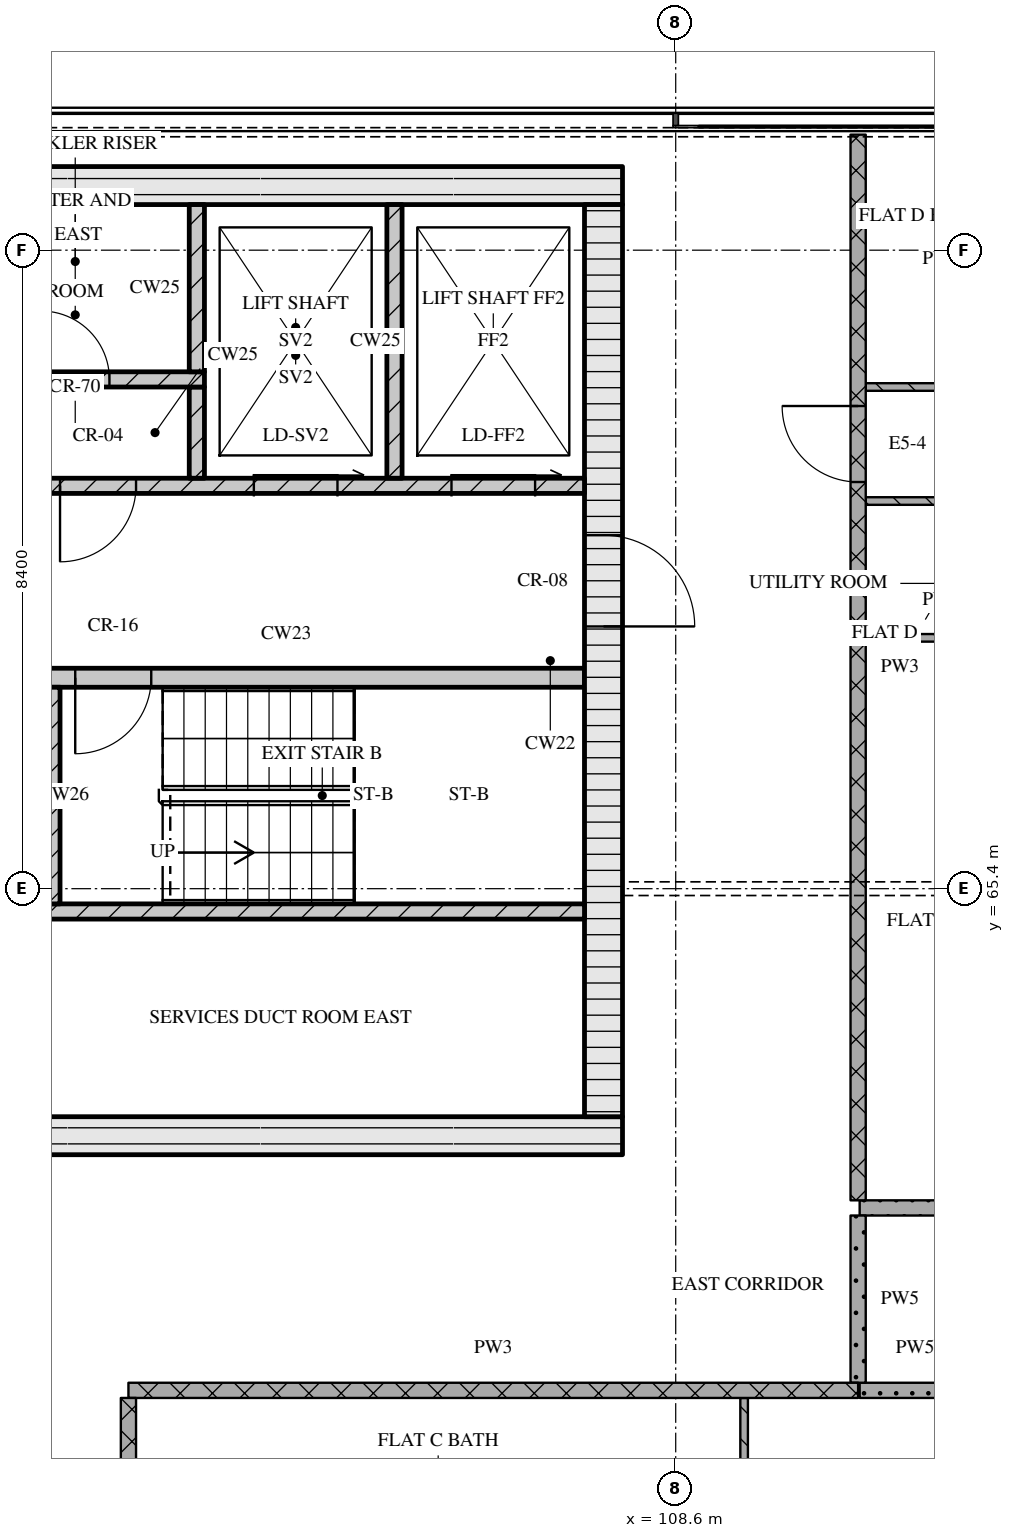
"""IFC4 building model, lengths in metres.
Left out: names, types, materials, properties, quantities, classifications, styles, units other than length and angle.
Written with IfcOpenShell. Run it as: python <this file> out.ifc"""

import sys

from ifc_helpers import new_model, si_unit, direction, frame, frame_2d, origin, place, context, subcontext, project, spatial, rectangle, extrude, element, fill, save


model = new_model("IFC4")
c1 = context("Model", 3, precision=1e-05, world=origin(), true_north=direction((0.0, 1.0)))
c2 = subcontext(c1, "Body", "Model", "MODEL_VIEW")
j1 = project(units=[si_unit("LENGTHUNIT", "METRE"), si_unit("PLANEANGLEUNIT", "RADIAN")], contexts=[c1])
p1 = place(None, origin())
s1 = spatial("IfcSite", under=j1, at=p1, CompositionType="ELEMENT")
p2 = place(p1, origin())
s2 = spatial("IfcBuilding", under=s1, at=p2, CompositionType="ELEMENT")
p3 = place(p2, frame((0.0, 0.0, 295.95)))
s3 = spatial("IfcBuildingStorey", under=s2, at=p3, CompositionType="ELEMENT", Elevation=295.95)
p4 = place(p3, frame((67.3, 62.15, 0.0), z_axis=(0.0, 0.0, 1.0), x_axis=(1.0, 0.0, 0.0)))
e1 = element("IfcWall", 1, at=p4, inside=s3, PredefinedType="SOLIDWALL", context=c2, shape_type="SweptSolid", body=[
    extrude(rectangle(XDim=40.6, YDim=0.5, at=frame_2d((20.3, 0.0))), origin(), (0.0, 0.0, 1.0), 3.32),
])
p5 = place(p4, frame((20.65, 0.0, 0.0)))
e2 = element("IfcOpeningElement", 2, at=p5, cuts=e1, PredefinedType="OPENING", context=c2, shape_type="SweptSolid", body=[
    extrude(rectangle(XDim=1.8, YDim=2.1, at=frame_2d((0.9, 1.05))), frame((0.0, 0.26, 0.0), z_axis=(0.0, -1.0, 0.0), x_axis=(1.0, 0.0, 0.0)), (0.0, 0.0, 1.0), 0.52),
])
p6 = place(p3, frame((67.3, 74.65, 0.0), z_axis=(0.0, 0.0, 1.0), x_axis=(1.0, 0.0, 0.0)))
e3 = element("IfcWall", 3, at=p6, inside=s3, PredefinedType="SOLIDWALL", context=c2, shape_type="SweptSolid", body=[
    extrude(rectangle(XDim=40.6, YDim=0.5, at=frame_2d((20.3, 0.0))), origin(), (0.0, 0.0, 1.0), 3.32),
])
p7 = place(p3, frame((107.65, 62.4, 0.0), z_axis=(0.0, 0.0, 1.0), x_axis=(0.0, 1.0, 0.0)))
e4 = element("IfcWall", 4, at=p7, inside=s3, PredefinedType="SOLIDWALL", context=c2, shape_type="SweptSolid", body=[
    extrude(rectangle(XDim=12.0, YDim=0.5, at=frame_2d((6.0, 0.0))), origin(), (0.0, 0.0, 1.0), 3.32),
])
p8 = place(p7, frame((6.45, 0.0, 0.0)))
e5 = element("IfcOpeningElement", 5, at=p8, cuts=e4, PredefinedType="OPENING", context=c2, shape_type="SweptSolid", body=[
    extrude(rectangle(XDim=1.2, YDim=2.1, at=frame_2d((0.6, 1.05))), frame((0.0, 0.26, 0.0), z_axis=(0.0, -1.0, 0.0), x_axis=(1.0, 0.0, 0.0)), (0.0, 0.0, 1.0), 0.52),
])
p9 = place(p3, frame((91.4, 65.1, 0.0), z_axis=(0.0, 0.0, 1.0), x_axis=(1.0, 0.0, 0.0)))
e6 = element("IfcWall", 6, at=p9, inside=s3, PredefinedType="SOLIDWALL", context=c2, shape_type="SweptSolid", body=[
    extrude(rectangle(XDim=16.0, YDim=0.2, at=frame_2d((8.0, 0.0))), origin(), (0.0, 0.0, 1.0), 3.32),
])
p10 = place(p9, frame((0.85, 0.0, 0.0)))
e7 = element("IfcOpeningElement", 7, at=p10, cuts=e6, PredefinedType="OPENING", context=c2, shape_type="SweptSolid", body=[
    extrude(rectangle(XDim=1.1, YDim=2.1, at=frame_2d((0.55, 1.05))), frame((0.0, 0.11, 0.0), z_axis=(0.0, -1.0, 0.0), x_axis=(1.0, 0.0, 0.0)), (0.0, 0.0, 1.0), 0.22),
])
p11 = place(p9, frame((3.35, 0.0, 0.0)))
e8 = element("IfcOpeningElement", 8, at=p11, cuts=e6, PredefinedType="OPENING", context=c2, shape_type="SweptSolid", body=[
    extrude(rectangle(XDim=1.1, YDim=2.1, at=frame_2d((0.55, 1.05))), frame((0.0, 0.11, 0.0), z_axis=(0.0, -1.0, 0.0), x_axis=(1.0, 0.0, 0.0)), (0.0, 0.0, 1.0), 0.22),
])
p12 = place(p9, frame((5.85, 0.0, 0.0)))
e9 = element("IfcOpeningElement", 9, at=p12, cuts=e6, PredefinedType="OPENING", context=c2, shape_type="SweptSolid", body=[
    extrude(rectangle(XDim=1.1, YDim=2.1, at=frame_2d((0.55, 1.05))), frame((0.0, 0.11, 0.0), z_axis=(0.0, -1.0, 0.0), x_axis=(1.0, 0.0, 0.0)), (0.0, 0.0, 1.0), 0.22),
])
p13 = place(p9, frame((7.83, 0.0, 0.0)))
e10 = element("IfcOpeningElement", 10, at=p13, cuts=e6, PredefinedType="OPENING", context=c2, shape_type="SweptSolid", body=[
    extrude(rectangle(XDim=0.9, YDim=2.1, at=frame_2d((0.45, 1.05))), frame((0.0, 0.11, 0.0), z_axis=(0.0, -1.0, 0.0), x_axis=(1.0, 0.0, 0.0)), (0.0, 0.0, 1.0), 0.22),
])
p14 = place(p3, frame((100.35, 65.2, 0.0), z_axis=(0.0, 0.0, 1.0), x_axis=(0.0, 1.0, 0.0)))
e11 = element("IfcWall", 11, at=p14, inside=s3, PredefinedType="SOLIDWALL", context=c2, shape_type="SweptSolid", body=[
    extrude(rectangle(XDim=2.85, YDim=0.3, at=frame_2d((1.425, 0.0))), origin(), (0.0, 0.0, 1.0), 3.32),
])
p15 = place(p3, frame((98.95, 68.175, 0.0), z_axis=(0.0, 0.0, 1.0), x_axis=(1.0, 0.0, 0.0)))
e12 = element("IfcWall", 12, at=p15, inside=s3, PredefinedType="SOLIDWALL", context=c2, shape_type="SweptSolid", body=[
    extrude(rectangle(XDim=8.45, YDim=0.25, at=frame_2d((4.225, 0.0))), origin(), (0.0, 0.0, 1.0), 3.32),
])
p16 = place(p15, frame((0.45, 0.0, 0.0)))
e13 = element("IfcOpeningElement", 13, at=p16, cuts=e12, PredefinedType="OPENING", context=c2, shape_type="SweptSolid", body=[
    extrude(rectangle(XDim=0.8, YDim=2.1, at=frame_2d((0.4, 1.05))), frame((0.0, 0.135, 0.0), z_axis=(0.0, -1.0, 0.0), x_axis=(1.0, 0.0, 0.0)), (0.0, 0.0, 1.0), 0.27),
])
p17 = place(p15, frame((1.75, 0.0, 0.0)))
e14 = element("IfcOpeningElement", 14, at=p17, cuts=e12, PredefinedType="OPENING", context=c2, shape_type="SweptSolid", body=[
    extrude(rectangle(XDim=1.0, YDim=2.1, at=frame_2d((0.5, 1.05))), frame((0.0, 0.135, 0.0), z_axis=(0.0, -1.0, 0.0), x_axis=(1.0, 0.0, 0.0)), (0.0, 0.0, 1.0), 0.27),
])
p18 = place(p3, frame((67.8, 70.7, 0.0), z_axis=(0.0, 0.0, 1.0), x_axis=(1.0, 0.0, 0.0)))
e15 = element("IfcWall", 15, at=p18, inside=s3, PredefinedType="SOLIDWALL", context=c2, shape_type="SweptSolid", body=[
    extrude(rectangle(XDim=39.6, YDim=0.2, at=frame_2d((19.8, 0.0))), origin(), (0.0, 0.0, 1.0), 3.32),
])
p19 = place(p18, frame((0.65, 0.0, 0.0)))
e16 = element("IfcOpeningElement", 16, at=p19, cuts=e15, PredefinedType="OPENING", context=c2, shape_type="SweptSolid", body=[
    extrude(rectangle(XDim=1.1, YDim=2.1, at=frame_2d((0.55, 1.05))), frame((0.0, 0.11, 0.0), z_axis=(0.0, -1.0, 0.0), x_axis=(1.0, 0.0, 0.0)), (0.0, 0.0, 1.0), 0.22),
])
p20 = place(p18, frame((3.25, 0.0, 0.0)))
e17 = element("IfcOpeningElement", 17, at=p20, cuts=e15, PredefinedType="OPENING", context=c2, shape_type="SweptSolid", body=[
    extrude(rectangle(XDim=1.1, YDim=2.1, at=frame_2d((0.55, 1.05))), frame((0.0, 0.11, 0.0), z_axis=(0.0, -1.0, 0.0), x_axis=(1.0, 0.0, 0.0)), (0.0, 0.0, 1.0), 0.22),
])
p21 = place(p18, frame((5.9, 0.0, 0.0)))
e18 = element("IfcOpeningElement", 18, at=p21, cuts=e15, PredefinedType="OPENING", context=c2, shape_type="SweptSolid", body=[
    extrude(rectangle(XDim=1.0, YDim=2.1, at=frame_2d((0.5, 1.05))), frame((0.0, 0.11, 0.0), z_axis=(0.0, -1.0, 0.0), x_axis=(1.0, 0.0, 0.0)), (0.0, 0.0, 1.0), 0.22),
])
p22 = place(p18, frame((21.7, 0.0, 0.0)))
e19 = element("IfcOpeningElement", 19, at=p22, cuts=e15, PredefinedType="OPENING", context=c2, shape_type="SweptSolid", body=[
    extrude(rectangle(XDim=1.0, YDim=2.1, at=frame_2d((0.5, 1.05))), frame((0.0, 0.11, 0.0), z_axis=(0.0, -1.0, 0.0), x_axis=(1.0, 0.0, 0.0)), (0.0, 0.0, 1.0), 0.22),
])
p23 = place(p18, frame((32.7, 0.0, 0.0)))
e20 = element("IfcOpeningElement", 20, at=p23, cuts=e15, PredefinedType="OPENING", context=c2, shape_type="SweptSolid", body=[
    extrude(rectangle(XDim=1.0, YDim=2.1, at=frame_2d((0.5, 1.05))), frame((0.0, 0.11, 0.0), z_axis=(0.0, -1.0, 0.0), x_axis=(1.0, 0.0, 0.0)), (0.0, 0.0, 1.0), 0.22),
])
p24 = place(p18, frame((35.25, 0.0, 0.0)))
e21 = element("IfcOpeningElement", 21, at=p24, cuts=e15, PredefinedType="OPENING", context=c2, shape_type="SweptSolid", body=[
    extrude(rectangle(XDim=1.1, YDim=2.1, at=frame_2d((0.55, 1.05))), frame((0.0, 0.11, 0.0), z_axis=(0.0, -1.0, 0.0), x_axis=(1.0, 0.0, 0.0)), (0.0, 0.0, 1.0), 0.22),
])
p25 = place(p18, frame((37.85, 0.0, 0.0)))
e22 = element("IfcOpeningElement", 22, at=p25, cuts=e15, PredefinedType="OPENING", context=c2, shape_type="SweptSolid", body=[
    extrude(rectangle(XDim=1.1, YDim=2.1, at=frame_2d((0.55, 1.05))), frame((0.0, 0.11, 0.0), z_axis=(0.0, -1.0, 0.0), x_axis=(1.0, 0.0, 0.0)), (0.0, 0.0, 1.0), 0.22),
])
p26 = place(p3, frame((102.3, 70.8, 0.0), z_axis=(0.0, 0.0, 1.0), x_axis=(0.0, 1.0, 0.0)))
e23 = element("IfcWall", 23, at=p26, inside=s3, PredefinedType="SOLIDWALL", context=c2, shape_type="SweptSolid", body=[
    extrude(rectangle(XDim=1.2, YDim=0.2, at=frame_2d((0.6, 0.0))), origin(), (0.0, 0.0, 1.0), 3.32),
])
p27 = place(p3, frame((104.9, 70.8, 0.0), z_axis=(0.0, 0.0, 1.0), x_axis=(0.0, 1.0, 0.0)))
e24 = element("IfcWall", 24, at=p27, inside=s3, PredefinedType="SOLIDWALL", context=c2, shape_type="SweptSolid", body=[
    extrude(rectangle(XDim=3.6, YDim=0.2, at=frame_2d((1.8, 0.0))), origin(), (0.0, 0.0, 1.0), 3.32),
])
p28 = place(p3, frame((96.68, 72.1, 0.0), z_axis=(0.0, 0.0, 1.0), x_axis=(1.0, 0.0, 0.0)))
e25 = element("IfcWall", 25, at=p28, inside=s3, PredefinedType="SOLIDWALL", context=c2, shape_type="SweptSolid", body=[
    extrude(rectangle(XDim=5.72, YDim=0.2, at=frame_2d((2.86, 0.0))), origin(), (0.0, 0.0, 1.0), 3.32),
])
p29 = place(p28, frame((0.77, 0.0, 0.0)))
e26 = element("IfcOpeningElement", 26, at=p29, cuts=e25, PredefinedType="OPENING", context=c2, shape_type="SweptSolid", body=[
    extrude(rectangle(XDim=0.9, YDim=2.1, at=frame_2d((0.45, 1.05))), frame((0.0, 0.11, 0.0), z_axis=(0.0, -1.0, 0.0), x_axis=(1.0, 0.0, 0.0)), (0.0, 0.0, 1.0), 0.22),
])
p30 = place(p28, frame((3.57, 0.0, 0.0)))
e27 = element("IfcOpeningElement", 27, at=p30, cuts=e25, PredefinedType="OPENING", context=c2, shape_type="SweptSolid", body=[
    extrude(rectangle(XDim=0.9, YDim=2.1, at=frame_2d((0.45, 1.05))), frame((0.0, 0.11, 0.0), z_axis=(0.0, -1.0, 0.0), x_axis=(1.0, 0.0, 0.0)), (0.0, 0.0, 1.0), 0.22),
])
p31 = place(p3, frame((102.3, 72.2, 0.0), z_axis=(0.0, 0.0, 1.0), x_axis=(0.0, 1.0, 0.0)))
e28 = element("IfcWall", 28, at=p31, inside=s3, PredefinedType="SOLIDWALL", context=c2, shape_type="SweptSolid", body=[
    extrude(rectangle(XDim=2.2, YDim=0.2, at=frame_2d((1.1, 0.0))), origin(), (0.0, 0.0, 1.0), 3.32),
])
p32 = place(p3, frame((101.4, 58.8, 0.0), z_axis=(0.0, 0.0, 1.0), x_axis=(1.0, 0.0, 0.0)))
e29 = element("IfcWall", 29, at=p32, inside=s3, PredefinedType="PARTITIONING", context=c2, shape_type="SweptSolid", body=[
    extrude(rectangle(XDim=9.6, YDim=0.2, at=frame_2d((4.8, 0.0))), origin(), (0.0, 0.0, 1.0), 3.32),
])
p33 = place(p3, frame((111.02, 58.8, 0.0), z_axis=(0.0, 0.0, 1.0), x_axis=(1.0, 0.0, 0.0)))
e30 = element("IfcWall", 30, at=p33, inside=s3, PredefinedType="PARTITIONING", context=c2, shape_type="SweptSolid", body=[
    extrude(rectangle(XDim=1.46, YDim=0.2, at=frame_2d((0.73, 0.0))), origin(), (0.0, 0.0, 1.0), 3.32),
])
p34 = place(p3, frame((111.02, 61.2, 0.0), z_axis=(0.0, 0.0, 1.0), x_axis=(1.0, 0.0, 0.0)))
e31 = element("IfcWall", 31, at=p34, inside=s3, PredefinedType="PARTITIONING", context=c2, shape_type="SweptSolid", body=[
    extrude(rectangle(XDim=2.66, YDim=0.2, at=frame_2d((1.33, 0.0))), origin(), (0.0, 0.0, 1.0), 3.32),
])
for number, where, z_axis, x_axis in (
    (32, (111.1, 68.7, 0.0), (0.0, 0.0, 1.0), (1.0, 0.0, 0.0)),
    (33, (111.1, 70.5, 0.0), (0.0, 0.0, 1.0), (1.0, 0.0, 0.0)),
    (34, (111.1, 72.0, 0.0), (0.0, 0.0, 1.0), (1.0, 0.0, 0.0)),
):
    element("IfcWall", number, at=place(p3, frame(where, z_axis=z_axis, x_axis=x_axis)), inside=s3, PredefinedType="PARTITIONING", context=c2, shape_type="SweptSolid", body=[
        extrude(rectangle(XDim=2.6, YDim=0.1, at=frame_2d((1.3, 0.0))), origin(), (0.0, 0.0, 1.0), 3.32),
    ])
p35 = place(p3, frame((101.4, 58.7, 0.0), z_axis=(0.0, 0.0, 1.0), x_axis=(0.0, -1.0, 0.0)))
e35 = element("IfcWall", 35, at=p35, inside=s3, PredefinedType="PARTITIONING", context=c2, shape_type="SweptSolid", body=[
    extrude(rectangle(XDim=8.0, YDim=0.2, at=frame_2d((4.0, 0.0))), origin(), (0.0, 0.0, 1.0), 3.32),
])
p36 = place(p35, frame((2.55, 0.0, 0.0)))
e36 = element("IfcOpeningElement", 36, at=p36, cuts=e35, PredefinedType="OPENING", context=c2, shape_type="SweptSolid", body=[
    extrude(rectangle(XDim=1.0, YDim=2.1, at=frame_2d((0.5, 1.05))), frame((0.0, 0.11, 0.0), z_axis=(0.0, -1.0, 0.0), x_axis=(1.0, 0.0, 0.0)), (0.0, 0.0, 1.0), 0.22),
])
p37 = place(p3, frame((109.5, 58.7, 0.0), z_axis=(0.0, 0.0, 1.0), x_axis=(0.0, -1.0, 0.0)))
e37 = element("IfcWall", 37, at=p37, inside=s3, PredefinedType="PARTITIONING", context=c2, shape_type="SweptSolid", body=[
    extrude(rectangle(XDim=2.25, YDim=0.1, at=frame_2d((1.125, 0.0))), origin(), (0.0, 0.0, 1.0), 3.32),
])
p38 = place(p3, frame((111.0, 75.32, 0.0), z_axis=(0.0, 0.0, 1.0), x_axis=(0.0, -1.0, 0.0)))
e38 = element("IfcWall", 38, at=p38, inside=s3, PredefinedType="PARTITIONING", context=c2, shape_type="SweptSolid", body=[
    extrude(rectangle(XDim=14.02, YDim=0.2, at=frame_2d((7.01, 0.0))), origin(), (0.0, 0.0, 1.0), 3.32),
])
p39 = place(p38, frame((3.57, 0.0, 0.0)))
e39 = element("IfcOpeningElement", 39, at=p39, cuts=e38, PredefinedType="OPENING", context=c2, shape_type="SweptSolid", body=[
    extrude(rectangle(XDim=1.0, YDim=2.1, at=frame_2d((0.5, 1.05))), frame((0.0, 0.11, 0.0), z_axis=(0.0, -1.0, 0.0), x_axis=(1.0, 0.0, 0.0)), (0.0, 0.0, 1.0), 0.22),
])
p40 = place(p3, frame((111.0, 61.1, 0.0), z_axis=(0.0, 0.0, 1.0), x_axis=(0.0, -1.0, 0.0)))
e40 = element("IfcWall", 40, at=p40, inside=s3, PredefinedType="PARTITIONING", context=c2, shape_type="SweptSolid", body=[
    extrude(rectangle(XDim=2.2, YDim=0.2, at=frame_2d((1.1, 0.0))), origin(), (0.0, 0.0, 1.0), 3.32),
])
p41 = place(p17, origin())
e41 = element("IfcDoor", 41, at=p41, inside=s3, OperationType="SINGLE_SWING_RIGHT", PredefinedType="DOOR", context=c2, shape_type="SweptSolid", body=[
    extrude(rectangle(XDim=1.0, YDim=2.1, at=frame_2d((0.5, 1.05))), frame((0.0, 0.025, 0.0), z_axis=(0.0, -1.0, 0.0), x_axis=(1.0, 0.0, 0.0)), (0.0, 0.0, 1.0), 0.05),
])
fill(e14, e41)
p42 = place(p8, origin())
e42 = element("IfcDoor", 42, at=p42, inside=s3, OperationType="SINGLE_SWING_RIGHT", PredefinedType="DOOR", context=c2, shape_type="SweptSolid", body=[
    extrude(rectangle(XDim=1.2, YDim=2.1, at=frame_2d((0.6, 1.05))), frame((0.0, 0.025, 0.0), z_axis=(0.0, -1.0, 0.0), x_axis=(1.0, 0.0, 0.0)), (0.0, 0.0, 1.0), 0.05),
])
fill(e5, e42)
p43 = place(p23, origin())
e43 = element("IfcDoor", 43, at=p43, inside=s3, OperationType="SINGLE_SWING_RIGHT", PredefinedType="DOOR", context=c2, shape_type="SweptSolid", body=[
    extrude(rectangle(XDim=1.0, YDim=2.1, at=frame_2d((0.5, 1.05))), frame((0.0, 0.025, 0.0), z_axis=(0.0, -1.0, 0.0), x_axis=(1.0, 0.0, 0.0)), (0.0, 0.0, 1.0), 0.05),
])
fill(e20, e43)
p44 = place(p24, origin())
e44 = element("IfcDoor", 44, at=p44, inside=s3, OperationType="SLIDING_TO_RIGHT", PredefinedType="DOOR", context=c2, shape_type="SweptSolid", body=[
    extrude(rectangle(XDim=1.1, YDim=2.1, at=frame_2d((0.55, 1.05))), frame((0.0, 0.025, 0.0), z_axis=(0.0, -1.0, 0.0), x_axis=(1.0, 0.0, 0.0)), (0.0, 0.0, 1.0), 0.05),
])
fill(e21, e44)
p45 = place(p25, origin())
e45 = element("IfcDoor", 45, at=p45, inside=s3, OperationType="SLIDING_TO_RIGHT", PredefinedType="DOOR", context=c2, shape_type="SweptSolid", body=[
    extrude(rectangle(XDim=1.1, YDim=2.1, at=frame_2d((0.55, 1.05))), frame((0.0, 0.025, 0.0), z_axis=(0.0, -1.0, 0.0), x_axis=(1.0, 0.0, 0.0)), (0.0, 0.0, 1.0), 0.05),
])
fill(e22, e45)
p46 = place(p30, origin())
e46 = element("IfcDoor", 46, at=p46, inside=s3, OperationType="SINGLE_SWING_LEFT", PredefinedType="DOOR", context=c2, shape_type="SweptSolid", body=[
    extrude(rectangle(XDim=0.9, YDim=2.1, at=frame_2d((0.45, 1.05))), frame((0.0, 0.025, 0.0), z_axis=(0.0, -1.0, 0.0), x_axis=(1.0, 0.0, 0.0)), (0.0, 0.0, 1.0), 0.05),
])
fill(e27, e46)
p47 = place(p39, origin())
e47 = element("IfcDoor", 47, at=p47, inside=s3, OperationType="SINGLE_SWING_RIGHT", PredefinedType="DOOR", context=c2, shape_type="SweptSolid", body=[
    extrude(rectangle(XDim=1.0, YDim=2.1, at=frame_2d((0.5, 1.05))), frame((0.0, 0.025, 0.0), z_axis=(0.0, -1.0, 0.0), x_axis=(1.0, 0.0, 0.0)), (0.0, 0.0, 1.0), 0.05),
])
fill(e39, e47)
save(model, sys.argv[1])
